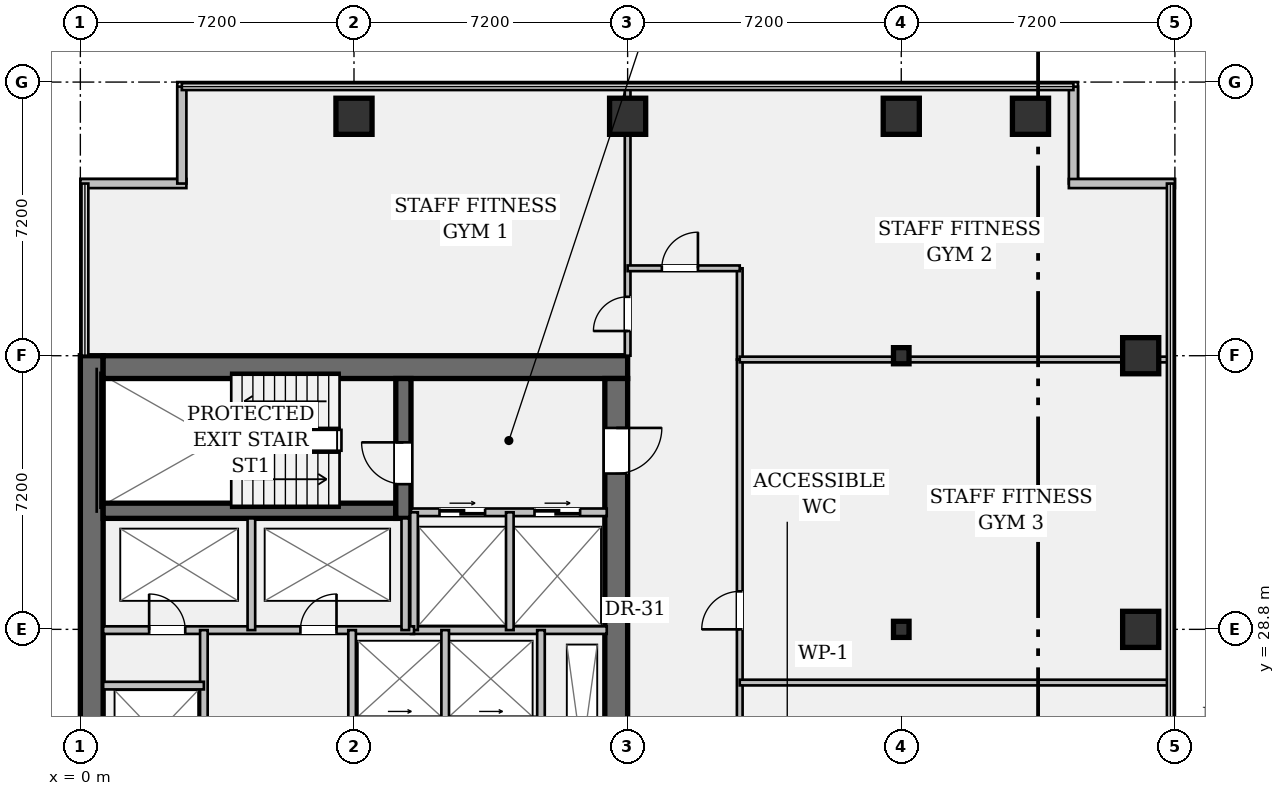
"""IFC4 building model, lengths in metres.
Left out: names, types, materials, properties, quantities, classifications, styles, units other than length and angle.
Written with IfcOpenShell. Run it as: python <this file> out.ifc"""

import sys

from ifc_helpers import new_model, si_unit, direction, frame, frame_2d, origin, origin_2d, place, context, subcontext, project, spatial, rectangle, hollow_rectangle, i_section, extrude, element, fill, save


model = new_model("IFC4")
c1 = context("Model", 3, precision=1e-05, world=origin(), true_north=direction((0.0, 1.0)))
c2 = subcontext(c1, "Body", "Model", "MODEL_VIEW")
j1 = project(units=[si_unit("LENGTHUNIT", "METRE"), si_unit("PLANEANGLEUNIT", "RADIAN")], contexts=[c1])
p1 = place(None, origin())
s1 = spatial("IfcSite", under=j1, at=p1, CompositionType="ELEMENT")
p2 = place(p1, origin())
s2 = spatial("IfcBuilding", under=s1, at=p2, CompositionType="ELEMENT")
p3 = place(p2, frame((0.0, 0.0, 77.35)))
s3 = spatial("IfcBuildingStorey", under=s2, at=p3, CompositionType="ELEMENT", Elevation=77.35)
p4 = place(p3, frame((0.3, 7.2, 0.0), z_axis=(0.0, 0.0, 1.0), x_axis=(0.0, 1.0, 0.0)))
e1 = element("IfcWall", 1, at=p4, inside=s3, PredefinedType="SHEAR", context=c2, shape_type="SweptSolid", body=[
    extrude(rectangle(XDim=28.8, YDim=0.6, at=frame_2d((14.4, 0.0))), origin(), (0.0, 0.0, 1.0), 3.57),
])
p5 = place(p3, frame((0.6, 35.7, 0.0), z_axis=(0.0, 0.0, 1.0), x_axis=(1.0, 0.0, 0.0)))
e2 = element("IfcWall", 2, at=p5, inside=s3, PredefinedType="SHEAR", context=c2, shape_type="SweptSolid", body=[
    extrude(rectangle(XDim=13.8, YDim=0.6, at=frame_2d((6.9, 0.0))), origin(), (0.0, 0.0, 1.0), 3.57),
])
p6 = place(p3, frame((14.1, 35.4, 0.0), z_axis=(0.0, 0.0, 1.0), x_axis=(0.0, -1.0, 0.0)))
e3 = element("IfcWall", 3, at=p6, inside=s3, PredefinedType="SHEAR", context=c2, shape_type="SweptSolid", body=[
    extrude(rectangle(XDim=27.6, YDim=0.6, at=frame_2d((13.8, 0.0))), origin(), (0.0, 0.0, 1.0), 3.57),
])
p7 = place(p6, frame((1.3, 0.0, 0.0)))
e4 = element("IfcOpeningElement", 4, at=p7, cuts=e3, PredefinedType="OPENING", context=c2, shape_type="SweptSolid", body=[
    extrude(rectangle(XDim=1.2, YDim=2.15, at=frame_2d((0.6, 1.075))), frame((0.0, 0.312, 0.0), z_axis=(0.0, -1.0, 0.0), x_axis=(1.0, 0.0, 0.0)), (0.0, 0.0, 1.0), 0.624),
])
p8 = place(p6, frame((25.25, 0.0, 0.0)))
e5 = element("IfcOpeningElement", 5, at=p8, cuts=e3, PredefinedType="OPENING", context=c2, shape_type="SweptSolid", body=[
    extrude(rectangle(XDim=1.2, YDim=2.15, at=frame_2d((0.6, 1.075))), frame((0.0, 0.312, 0.0), z_axis=(0.0, -1.0, 0.0), x_axis=(1.0, 0.0, 0.0)), (0.0, 0.0, 1.0), 0.624),
])
p9 = place(p6, frame((14.6, 0.0, 0.0)))
e6 = element("IfcOpeningElement", 6, at=p9, cuts=e3, PredefinedType="OPENING", context=c2, shape_type="SweptSolid", body=[
    extrude(rectangle(XDim=1.6, YDim=2.2, at=frame_2d((0.8, 1.1))), frame((0.0, 0.312, 0.0), z_axis=(0.0, -1.0, 0.0), x_axis=(1.0, 0.0, 0.0)), (0.0, 0.0, 1.0), 0.624),
])
p10 = place(p3, frame((0.6, 31.92, 0.0), z_axis=(0.0, 0.0, 1.0), x_axis=(1.0, 0.0, 0.0)))
e7 = element("IfcWall", 7, at=p10, inside=s3, PredefinedType="SHEAR", context=c2, shape_type="SweptSolid", body=[
    extrude(rectangle(XDim=7.7, YDim=0.4, at=frame_2d((3.85, 0.0))), origin(), (0.0, 0.0, 1.0), 3.57),
])
p11 = place(p3, frame((8.5, 31.72, 0.0), z_axis=(0.0, 0.0, 1.0), x_axis=(0.0, 1.0, 0.0)))
e8 = element("IfcWall", 8, at=p11, inside=s3, PredefinedType="SHEAR", context=c2, shape_type="SweptSolid", body=[
    extrude(rectangle(XDim=3.68, YDim=0.4, at=frame_2d((1.84, 0.0))), origin(), (0.0, 0.0, 1.0), 3.57),
])
p12 = place(p11, frame((0.9, 0.0, 0.0)))
e9 = element("IfcOpeningElement", 9, at=p12, cuts=e8, PredefinedType="OPENING", context=c2, shape_type="SweptSolid", body=[
    extrude(rectangle(XDim=1.1, YDim=2.15, at=frame_2d((0.55, 1.075))), frame((0.0, 0.212, 0.0), z_axis=(0.0, -1.0, 0.0), x_axis=(1.0, 0.0, 0.0)), (0.0, 0.0, 1.0), 0.424),
])
for number, where, z_axis, x_axis in (
    (10, (7.2, 42.3, 0.0), (0.0, 0.0, 1.0), (1.0, 0.0, 0.0)),
    (11, (14.4, 42.3, 0.0), (0.0, 0.0, 1.0), (1.0, 0.0, 0.0)),
):
    element("IfcColumn", number, at=place(p3, frame(where, z_axis=z_axis, x_axis=x_axis)), inside=s3, PredefinedType="COLUMN", context=c2, shape_type="SweptSolid", body=[
        extrude(hollow_rectangle(XDim=0.95, YDim=0.95, WallThickness=0.06, at=origin_2d()), origin(), (0.0, 0.0, 1.0), 3.57),
    ])
for number, where, z_axis, x_axis in (
    (12, (21.6, 28.8, 0.0), (0.0, 0.0, 1.0), (1.0, 0.0, 0.0)),
    (13, (21.6, 36.0, 0.0), (0.0, 0.0, 1.0), (1.0, 0.0, 0.0)),
):
    element("IfcColumn", number, at=place(p3, frame(where, z_axis=z_axis, x_axis=x_axis)), inside=s3, PredefinedType="COLUMN", context=c2, shape_type="SweptSolid", body=[
        extrude(i_section(OverallWidth=0.409, OverallDepth=0.424, WebThickness=0.033, FlangeThickness=0.052, FilletRadius=0.018, at=origin_2d()), origin(), (0.0, 0.0, 1.0), 3.57),
    ])
for number, where, z_axis, x_axis in (
    (14, (21.6, 42.3, 0.0), (0.0, 0.0, 1.0), (1.0, 0.0, 0.0)),
    (15, (25.0, 42.3, 0.0), (0.0, 0.0, 1.0), (1.0, 0.0, 0.0)),
    (16, (27.9, 28.8, 0.0), (0.0, 0.0, 1.0), (1.0, 0.0, 0.0)),
    (17, (27.9, 36.0, 0.0), (0.0, 0.0, 1.0), (1.0, 0.0, 0.0)),
):
    element("IfcColumn", number, at=place(p3, frame(where, z_axis=z_axis, x_axis=x_axis)), inside=s3, PredefinedType="COLUMN", context=c2, shape_type="SweptSolid", body=[
        extrude(hollow_rectangle(XDim=0.95, YDim=0.95, WallThickness=0.06, at=origin_2d()), origin(), (0.0, 0.0, 1.0), 3.57),
    ])
p13 = place(p3, frame((0.0, 40.53, 0.0), z_axis=(0.0, 0.0, 1.0), x_axis=(1.0, 0.0, 0.0)))
e18 = element("IfcWall", 18, at=p13, inside=s3, PredefinedType="STANDARD", context=c2, shape_type="SweptSolid", body=[
    extrude(rectangle(XDim=2.79, YDim=0.24, at=frame_2d((1.395, 0.0))), origin(), (0.0, 0.0, 1.0), 3.57),
])
for number, where, z_axis, x_axis in (
    (19, (2.67, 40.53, 0.0), (0.0, 0.0, 1.0), (0.0, 1.0, 0.0)),
    (20, (26.13, 43.08, 0.0), (0.0, 0.0, 1.0), (0.0, -1.0, 0.0)),
):
    element("IfcWall", number, at=place(p3, frame(where, z_axis=z_axis, x_axis=x_axis)), inside=s3, PredefinedType="STANDARD", context=c2, shape_type="SweptSolid", body=[
        extrude(rectangle(XDim=2.55, YDim=0.24, at=frame_2d((1.275, 0.0))), origin(), (0.0, 0.0, 1.0), 3.57),
    ])
p14 = place(p3, frame((26.01, 40.53, 0.0), z_axis=(0.0, 0.0, 1.0), x_axis=(1.0, 0.0, 0.0)))
e21 = element("IfcWall", 21, at=p14, inside=s3, PredefinedType="STANDARD", context=c2, shape_type="SweptSolid", body=[
    extrude(rectangle(XDim=2.79, YDim=0.24, at=frame_2d((1.395, 0.0))), origin(), (0.0, 0.0, 1.0), 3.57),
])
p15 = place(p3, frame((8.7, 31.88, 0.0), z_axis=(0.0, 0.0, 1.0), x_axis=(1.0, 0.0, 0.0)))
e22 = element("IfcWall", 22, at=p15, inside=s3, PredefinedType="PARTITIONING", context=c2, shape_type="SweptSolid", body=[
    extrude(rectangle(XDim=5.15, YDim=0.2, at=frame_2d((2.575, 0.0))), origin(), (0.0, 0.0, 1.0), 3.57),
])
p16 = place(p15, frame((0.75, 0.0, 0.0)))
e23 = element("IfcOpeningElement", 23, at=p16, cuts=e22, PredefinedType="OPENING", context=c2, shape_type="SweptSolid", body=[
    extrude(rectangle(XDim=1.2, YDim=2.2, at=frame_2d((0.6, 1.1))), frame((0.0, 0.112, 0.0), z_axis=(0.0, -1.0, 0.0), x_axis=(1.0, 0.0, 0.0)), (0.0, 0.0, 1.0), 0.224),
])
p17 = place(p15, frame((3.25, 0.0, 0.0)))
e24 = element("IfcOpeningElement", 24, at=p17, cuts=e22, PredefinedType="OPENING", context=c2, shape_type="SweptSolid", body=[
    extrude(rectangle(XDim=1.2, YDim=2.2, at=frame_2d((0.6, 1.1))), frame((0.0, 0.112, 0.0), z_axis=(0.0, -1.0, 0.0), x_axis=(1.0, 0.0, 0.0)), (0.0, 0.0, 1.0), 0.224),
])
p18 = place(p3, frame((8.7, 28.78, 0.0), z_axis=(0.0, 0.0, 1.0), x_axis=(1.0, 0.0, 0.0)))
e25 = element("IfcWall", 25, at=p18, inside=s3, PredefinedType="PARTITIONING", context=c2, shape_type="SweptSolid", body=[
    extrude(rectangle(XDim=5.15, YDim=0.2, at=frame_2d((2.575, 0.0))), origin(), (0.0, 0.0, 1.0), 3.57),
])
for number, where, z_axis, x_axis in (
    (26, (8.78, 28.78, 0.0), (0.0, 0.0, 1.0), (0.0, 1.0, 0.0)),
    (27, (11.3, 28.78, 0.0), (0.0, 0.0, 1.0), (0.0, 1.0, 0.0)),
):
    element("IfcWall", number, at=place(p3, frame(where, z_axis=z_axis, x_axis=x_axis)), inside=s3, PredefinedType="PARTITIONING", context=c2, shape_type="SweptSolid", body=[
        extrude(rectangle(XDim=3.1, YDim=0.2, at=frame_2d((1.55, 0.0))), origin(), (0.0, 0.0, 1.0), 3.57),
    ])
p19 = place(p3, frame((0.6, 28.78, 0.0), z_axis=(0.0, 0.0, 1.0), x_axis=(1.0, 0.0, 0.0)))
e28 = element("IfcWall", 28, at=p19, inside=s3, PredefinedType="PARTITIONING", context=c2, shape_type="SweptSolid", body=[
    extrude(rectangle(XDim=8.18, YDim=0.2, at=frame_2d((4.09, 0.0))), origin(), (0.0, 0.0, 1.0), 3.57),
])
p20 = place(p19, frame((1.21, 0.0, 0.0)))
e29 = element("IfcOpeningElement", 29, at=p20, cuts=e28, PredefinedType="OPENING", context=c2, shape_type="SweptSolid", body=[
    extrude(rectangle(XDim=0.95, YDim=2.15, at=frame_2d((0.475, 1.075))), frame((0.0, 0.112, 0.0), z_axis=(0.0, -1.0, 0.0), x_axis=(1.0, 0.0, 0.0)), (0.0, 0.0, 1.0), 0.224),
])
p21 = place(p19, frame((5.19, 0.0, 0.0)))
e30 = element("IfcOpeningElement", 30, at=p21, cuts=e28, PredefinedType="OPENING", context=c2, shape_type="SweptSolid", body=[
    extrude(rectangle(XDim=0.95, YDim=2.15, at=frame_2d((0.475, 1.075))), frame((0.0, 0.112, 0.0), z_axis=(0.0, -1.0, 0.0), x_axis=(1.0, 0.0, 0.0)), (0.0, 0.0, 1.0), 0.224),
])
for number, where, z_axis, x_axis in (
    (31, (4.5, 28.78, 0.0), (0.0, 0.0, 1.0), (0.0, 1.0, 0.0)),
    (32, (8.55, 28.78, 0.0), (0.0, 0.0, 1.0), (0.0, 1.0, 0.0)),
):
    element("IfcWall", number, at=place(p3, frame(where, z_axis=z_axis, x_axis=x_axis)), inside=s3, PredefinedType="PARTITIONING", context=c2, shape_type="SweptSolid", body=[
        extrude(rectangle(XDim=2.94, YDim=0.2, at=frame_2d((1.47, 0.0))), origin(), (0.0, 0.0, 1.0), 3.57),
    ])
p22 = place(p3, frame((3.25, 15.7, 0.0), z_axis=(0.0, 0.0, 1.0), x_axis=(0.0, 1.0, 0.0)))
e33 = element("IfcWall", 33, at=p22, inside=s3, PredefinedType="PARTITIONING", context=c2, shape_type="SweptSolid", body=[
    extrude(rectangle(XDim=13.08, YDim=0.2, at=frame_2d((6.54, 0.0))), origin(), (0.0, 0.0, 1.0), 3.57),
])
p23 = place(p3, frame((0.6, 27.32, 0.0), z_axis=(0.0, 0.0, 1.0), x_axis=(1.0, 0.0, 0.0)))
e34 = element("IfcWall", 34, at=p23, inside=s3, PredefinedType="PARTITIONING", context=c2, shape_type="SweptSolid", body=[
    extrude(rectangle(XDim=2.65, YDim=0.2, at=frame_2d((1.325, 0.0))), origin(), (0.0, 0.0, 1.0), 3.57),
])
for number, where, z_axis, x_axis in (
    (35, (7.15, 26.4, 0.0), (0.0, 0.0, 1.0), (0.0, 1.0, 0.0)),
    (36, (9.6, 26.4, 0.0), (0.0, 0.0, 1.0), (0.0, 1.0, 0.0)),
):
    element("IfcWall", number, at=place(p3, frame(where, z_axis=z_axis, x_axis=x_axis)), inside=s3, PredefinedType="PARTITIONING", context=c2, shape_type="SweptSolid", body=[
        extrude(rectangle(XDim=2.38, YDim=0.2, at=frame_2d((1.19, 0.0))), origin(), (0.0, 0.0, 1.0), 3.57),
    ])
p24 = place(p3, frame((12.12, 22.2, 0.0), z_axis=(0.0, 0.0, 1.0), x_axis=(0.0, 1.0, 0.0)))
e37 = element("IfcWall", 37, at=p24, inside=s3, PredefinedType="PARTITIONING", context=c2, shape_type="SweptSolid", body=[
    extrude(rectangle(XDim=6.58, YDim=0.2, at=frame_2d((3.29, 0.0))), origin(), (0.0, 0.0, 1.0), 3.57),
])
p25 = place(p24, frame((2.75, 0.0, 0.0)))
e38 = element("IfcOpeningElement", 38, at=p25, cuts=e37, PredefinedType="OPENING", context=c2, shape_type="SweptSolid", body=[
    extrude(rectangle(XDim=0.85, YDim=2.15, at=frame_2d((0.425, 1.075))), frame((0.0, 0.112, 0.0), z_axis=(0.0, -1.0, 0.0), x_axis=(1.0, 0.0, 0.0)), (0.0, 0.0, 1.0), 0.224),
])
p26 = place(p3, frame((17.35, 20.4, 0.0), z_axis=(0.0, 0.0, 1.0), x_axis=(0.0, 1.0, 0.0)))
e39 = element("IfcWall", 39, at=p26, inside=s3, PredefinedType="PARTITIONING", context=c2, shape_type="SweptSolid", body=[
    extrude(rectangle(XDim=15.5, YDim=0.15, at=frame_2d((7.75, 0.0))), origin(), (0.0, 0.0, 1.0), 2.783),
])
p27 = place(p26, frame((4.3, 0.0, 0.0)))
e40 = element("IfcOpeningElement", 40, at=p27, cuts=e39, PredefinedType="OPENING", context=c2, shape_type="SweptSolid", body=[
    extrude(rectangle(XDim=0.95, YDim=2.15, at=frame_2d((0.475, 1.075))), frame((0.0, 0.087, 0.0), z_axis=(0.0, -1.0, 0.0), x_axis=(1.0, 0.0, 0.0)), (0.0, 0.0, 1.0), 0.174),
])
p28 = place(p26, frame((8.4, 0.0, 0.0)))
e41 = element("IfcOpeningElement", 41, at=p28, cuts=e39, PredefinedType="OPENING", context=c2, shape_type="SweptSolid", body=[
    extrude(rectangle(XDim=1.0, YDim=2.15, at=frame_2d((0.5, 1.075))), frame((0.0, 0.087, 0.0), z_axis=(0.0, -1.0, 0.0), x_axis=(1.0, 0.0, 0.0)), (0.0, 0.0, 1.0), 0.174),
])
p29 = place(p3, frame((14.4, 36.0, 0.0), z_axis=(0.0, 0.0, 1.0), x_axis=(0.0, 1.0, 0.0)))
e42 = element("IfcWall", 42, at=p29, inside=s3, PredefinedType="PARTITIONING", context=c2, shape_type="SweptSolid", body=[
    extrude(rectangle(XDim=7.08, YDim=0.15, at=frame_2d((3.54, 0.0))), origin(), (0.0, 0.0, 1.0), 2.783),
])
p30 = place(p29, frame((0.65, 0.0, 0.0)))
e43 = element("IfcOpeningElement", 43, at=p30, cuts=e42, PredefinedType="OPENING", context=c2, shape_type="SweptSolid", body=[
    extrude(rectangle(XDim=0.9, YDim=2.15, at=frame_2d((0.45, 1.075))), frame((0.0, 0.087, 0.0), z_axis=(0.0, -1.0, 0.0), x_axis=(1.0, 0.0, 0.0)), (0.0, 0.0, 1.0), 0.174),
])
p31 = place(p3, frame((17.35, 35.9, 0.0), z_axis=(0.0, 0.0, 1.0), x_axis=(0.0, 1.0, 0.0)))
e44 = element("IfcWall", 44, at=p31, inside=s3, PredefinedType="PARTITIONING", context=c2, shape_type="SweptSolid", body=[
    extrude(rectangle(XDim=2.4, YDim=0.15, at=frame_2d((1.2, 0.0))), origin(), (0.0, 0.0, 1.0), 2.783),
])
p32 = place(p3, frame((14.4, 38.3, 0.0), z_axis=(0.0, 0.0, 1.0), x_axis=(1.0, 0.0, 0.0)))
e45 = element("IfcWall", 45, at=p32, inside=s3, PredefinedType="PARTITIONING", context=c2, shape_type="SweptSolid", body=[
    extrude(rectangle(XDim=2.95, YDim=0.15, at=frame_2d((1.475, 0.0))), origin(), (0.0, 0.0, 1.0), 2.783),
])
p33 = place(p32, frame((0.9, 0.0, 0.0)))
e46 = element("IfcOpeningElement", 46, at=p33, cuts=e45, PredefinedType="OPENING", context=c2, shape_type="SweptSolid", body=[
    extrude(rectangle(XDim=0.95, YDim=2.15, at=frame_2d((0.475, 1.075))), frame((0.0, 0.087, 0.0), z_axis=(0.0, -1.0, 0.0), x_axis=(1.0, 0.0, 0.0)), (0.0, 0.0, 1.0), 0.174),
])
for number, where, z_axis, x_axis in (
    (47, (17.35, 35.9, 0.0), (0.0, 0.0, 1.0), (1.0, 0.0, 0.0)),
    (48, (17.35, 27.4, 0.0), (0.0, 0.0, 1.0), (1.0, 0.0, 0.0)),
):
    element("IfcWall", number, at=place(p3, frame(where, z_axis=z_axis, x_axis=x_axis)), inside=s3, PredefinedType="PARTITIONING", context=c2, shape_type="SweptSolid", body=[
        extrude(rectangle(XDim=11.33, YDim=0.15, at=frame_2d((5.665, 0.0))), origin(), (0.0, 0.0, 1.0), 2.783),
    ])
p34 = place(p12, origin())
e49 = element("IfcDoor", 49, at=p34, inside=s3, OperationType="SINGLE_SWING_RIGHT", PredefinedType="DOOR", context=c2, shape_type="SweptSolid", body=[
    extrude(rectangle(XDim=1.1, YDim=2.15, at=frame_2d((0.55, 1.075))), frame((0.0, 0.025, 0.0), z_axis=(0.0, -1.0, 0.0), x_axis=(1.0, 0.0, 0.0)), (0.0, 0.0, 1.0), 0.05),
])
fill(e9, e49)
p35 = place(p7, origin())
e50 = element("IfcDoor", 50, at=p35, inside=s3, OperationType="SINGLE_SWING_LEFT", PredefinedType="DOOR", context=c2, shape_type="SweptSolid", body=[
    extrude(rectangle(XDim=1.2, YDim=2.15, at=frame_2d((0.6, 1.075))), frame((0.0, 0.025, 0.0), z_axis=(0.0, -1.0, 0.0), x_axis=(1.0, 0.0, 0.0)), (0.0, 0.0, 1.0), 0.05),
])
fill(e4, e50)
p36 = place(p16, origin())
e51 = element("IfcDoor", 51, at=p36, inside=s3, OperationType="DOUBLE_DOOR_SLIDING", PredefinedType="DOOR", context=c2, shape_type="SweptSolid", body=[
    extrude(rectangle(XDim=1.2, YDim=2.2, at=frame_2d((0.6, 1.1))), frame((0.0, 0.025, 0.0), z_axis=(0.0, -1.0, 0.0), x_axis=(1.0, 0.0, 0.0)), (0.0, 0.0, 1.0), 0.05),
])
fill(e23, e51)
p37 = place(p17, origin())
e52 = element("IfcDoor", 52, at=p37, inside=s3, OperationType="DOUBLE_DOOR_SLIDING", PredefinedType="DOOR", context=c2, shape_type="SweptSolid", body=[
    extrude(rectangle(XDim=1.2, YDim=2.2, at=frame_2d((0.6, 1.1))), frame((0.0, 0.025, 0.0), z_axis=(0.0, -1.0, 0.0), x_axis=(1.0, 0.0, 0.0)), (0.0, 0.0, 1.0), 0.05),
])
fill(e24, e52)
p38 = place(p20, origin())
e53 = element("IfcDoor", 53, at=p38, inside=s3, OperationType="SINGLE_SWING_LEFT", PredefinedType="DOOR", context=c2, shape_type="SweptSolid", body=[
    extrude(rectangle(XDim=0.95, YDim=2.15, at=frame_2d((0.475, 1.075))), frame((0.0, 0.025, 0.0), z_axis=(0.0, -1.0, 0.0), x_axis=(1.0, 0.0, 0.0)), (0.0, 0.0, 1.0), 0.05),
])
fill(e29, e53)
p39 = place(p21, origin())
e54 = element("IfcDoor", 54, at=p39, inside=s3, OperationType="SINGLE_SWING_RIGHT", PredefinedType="DOOR", context=c2, shape_type="SweptSolid", body=[
    extrude(rectangle(XDim=0.95, YDim=2.15, at=frame_2d((0.475, 1.075))), frame((0.0, 0.025, 0.0), z_axis=(0.0, -1.0, 0.0), x_axis=(1.0, 0.0, 0.0)), (0.0, 0.0, 1.0), 0.05),
])
fill(e30, e54)
p40 = place(p30, origin())
e55 = element("IfcDoor", 55, at=p40, inside=s3, OperationType="SINGLE_SWING_LEFT", PredefinedType="DOOR", context=c2, shape_type="SweptSolid", body=[
    extrude(rectangle(XDim=0.9, YDim=2.15, at=frame_2d((0.45, 1.075))), frame((0.0, 0.025, 0.0), z_axis=(0.0, -1.0, 0.0), x_axis=(1.0, 0.0, 0.0)), (0.0, 0.0, 1.0), 0.05),
])
fill(e43, e55)
p41 = place(p33, origin())
e56 = element("IfcDoor", 56, at=p41, inside=s3, OperationType="SINGLE_SWING_RIGHT", PredefinedType="DOOR", context=c2, shape_type="SweptSolid", body=[
    extrude(rectangle(XDim=0.95, YDim=2.15, at=frame_2d((0.475, 1.075))), frame((0.0, 0.025, 0.0), z_axis=(0.0, -1.0, 0.0), x_axis=(1.0, 0.0, 0.0)), (0.0, 0.0, 1.0), 0.05),
])
fill(e46, e56)
p42 = place(p28, origin())
e57 = element("IfcDoor", 57, at=p42, inside=s3, OperationType="SINGLE_SWING_LEFT", PredefinedType="DOOR", context=c2, shape_type="SweptSolid", body=[
    extrude(rectangle(XDim=1.0, YDim=2.15, at=frame_2d((0.5, 1.075))), frame((0.0, 0.025, 0.0), z_axis=(0.0, -1.0, 0.0), x_axis=(1.0, 0.0, 0.0)), (0.0, 0.0, 1.0), 0.05),
])
fill(e41, e57)
save(model, sys.argv[1])
